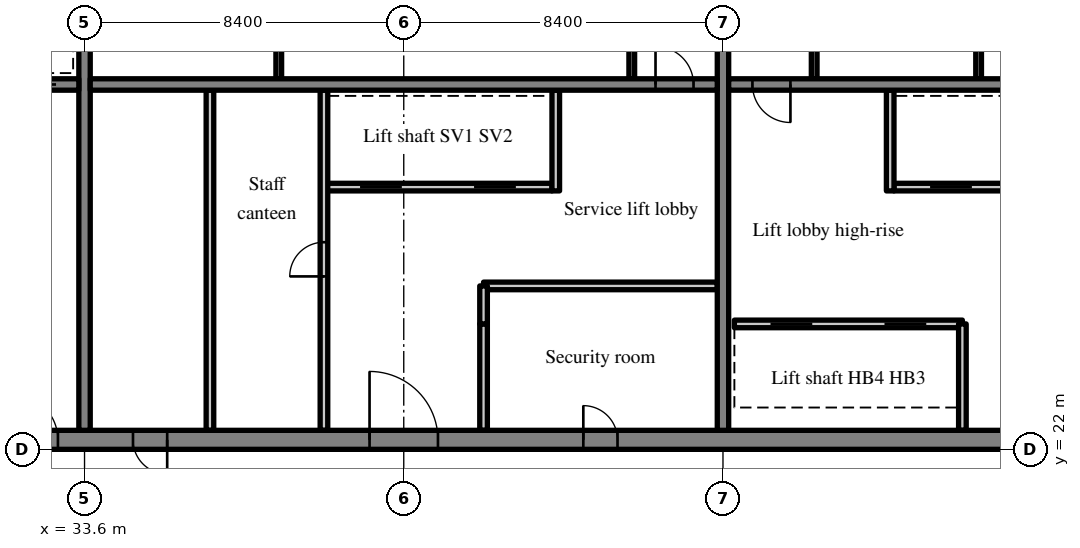
"""IFC4 building model, lengths in metres.
Left out: names, types, materials, properties, quantities, classifications, styles, units other than length and angle.
Written with IfcOpenShell. Run it as: python <this file> out.ifc"""

import sys

from ifc_helpers import new_model, si_unit, direction, frame, frame_2d, origin, place, context, subcontext, project, spatial, rectangle, extrude, source, transform, mapped, element, fill, save


model = new_model("IFC4")
c1 = context("Model", 3, precision=1e-05, world=origin(), true_north=direction((0.0, 1.0)))
c2 = subcontext(c1, "Body", "Model", "MODEL_VIEW")
j1 = project(units=[si_unit("LENGTHUNIT", "METRE"), si_unit("PLANEANGLEUNIT", "RADIAN")], contexts=[c1])
p1 = place(None, origin())
s1 = spatial("IfcSite", under=j1, at=p1, CompositionType="ELEMENT")
p2 = place(p1, origin())
s2 = spatial("IfcBuilding", under=s1, at=p2, CompositionType="ELEMENT")
p3 = place(p2, frame((0.0, 0.0, 323.7)))
s3 = spatial("IfcBuildingStorey", under=s2, at=p3, CompositionType="ELEMENT", Elevation=323.7)
m1 = source(origin(), c2, "Body", "SweptSolid", [
    extrude(rectangle(XDim=50.4, YDim=0.5, at=frame_2d((25.2, 0.0))), origin(), (0.0, 0.0, 1.0), 5.72),
])
p4 = place(p3, frame((25.2, 22.25, 0.0), z_axis=(0.0, 0.0, 1.0), x_axis=(1.0, 0.0, 0.0)))
e1 = element("IfcWall", 1, at=p4, inside=s3, PredefinedType="SHEAR", context=c2, shape_type="MappedRepresentation", body=[
    mapped(m1, transform((0.0, 0.0, 0.0), scale=1.0)),
])
m2 = source(origin(), c2, "Body", "SweptSolid", [
    extrude(rectangle(XDim=1.8, YDim=2.1, at=frame_2d((0.9, 1.05))), frame((0.0, 0.26, 0.0), z_axis=(0.0, -1.0, 0.0), x_axis=(1.0, 0.0, 0.0)), (0.0, 0.0, 1.0), 0.52),
])
p5 = place(p4, frame((15.9, 0.0, 0.0)))
e2 = element("IfcOpeningElement", 2, at=p5, cuts=e1, PredefinedType="OPENING", context=c2, shape_type="MappedRepresentation", body=[
    mapped(m2, transform((0.0, 0.0, 0.0), scale=1.0)),
])
m3 = source(origin(), c2, "Body", "SweptSolid", [
    extrude(rectangle(XDim=0.9, YDim=2.1, at=frame_2d((0.45, 1.05))), frame((0.0, 0.26, 0.0), z_axis=(0.0, -1.0, 0.0), x_axis=(1.0, 0.0, 0.0)), (0.0, 0.0, 1.0), 0.52),
])
p6 = place(p4, frame((9.675, 0.0, 0.0)))
e3 = element("IfcOpeningElement", 3, at=p6, cuts=e1, PredefinedType="OPENING", context=c2, shape_type="MappedRepresentation", body=[
    mapped(m3, transform((0.0, 0.0, 0.0), scale=1.0)),
])
p7 = place(p4, frame((21.525, 0.0, 0.0)))
e4 = element("IfcOpeningElement", 4, at=p7, cuts=e1, PredefinedType="OPENING", context=c2, shape_type="MappedRepresentation", body=[
    mapped(m3, transform((0.0, 0.0, 0.0), scale=1.0)),
])
p8 = place(p4, frame((32.7, 0.0, 0.0)))
e5 = element("IfcOpeningElement", 5, at=p8, cuts=e1, PredefinedType="OPENING", context=c2, shape_type="MappedRepresentation", body=[
    mapped(m2, transform((0.0, 0.0, 0.0), scale=1.0)),
])
m4 = source(origin(), c2, "Body", "SweptSolid", [
    extrude(rectangle(XDim=1.2, YDim=2.1, at=frame_2d((0.6, 1.05))), frame((0.0, 0.26, 0.0), z_axis=(0.0, -1.0, 0.0), x_axis=(1.0, 0.0, 0.0)), (0.0, 0.0, 1.0), 0.52),
])
p9 = place(p4, frame((6.5, 0.0, 0.0)))
e6 = element("IfcOpeningElement", 6, at=p9, cuts=e1, PredefinedType="OPENING", context=c2, shape_type="MappedRepresentation", body=[
    mapped(m4, transform((0.0, 0.0, 0.0), scale=1.0)),
])
p10 = place(p4, frame((47.975, 0.0, 0.0)))
e7 = element("IfcOpeningElement", 7, at=p10, cuts=e1, PredefinedType="OPENING", context=c2, shape_type="MappedRepresentation", body=[
    mapped(m4, transform((0.0, 0.0, 0.0), scale=1.0)),
])
m5 = source(origin(), c2, "Body", "SweptSolid", [
    extrude(rectangle(XDim=19.0, YDim=0.3, at=frame_2d((9.5, 0.0))), origin(), (0.0, 0.0, 1.0), 5.72),
])
p11 = place(p3, frame((33.6, 22.5, 0.0), z_axis=(0.0, 0.0, 1.0), x_axis=(0.0, 1.0, 0.0)))
e8 = element("IfcWall", 8, at=p11, inside=s3, PredefinedType="SHEAR", context=c2, shape_type="MappedRepresentation", body=[
    mapped(m5, transform((0.0, 0.0, 0.0), scale=1.0)),
])
m6 = source(origin(), c2, "Body", "SweptSolid", [
    extrude(rectangle(XDim=1.1, YDim=2.1, at=frame_2d((0.55, 1.05))), frame((0.0, 0.16, 0.0), z_axis=(0.0, -1.0, 0.0), x_axis=(1.0, 0.0, 0.0)), (0.0, 0.0, 1.0), 0.32),
])
p12 = place(p11, frame((12.95, 0.0, 0.0)))
e9 = element("IfcOpeningElement", 9, at=p12, cuts=e8, PredefinedType="OPENING", context=c2, shape_type="MappedRepresentation", body=[
    mapped(m6, transform((0.0, 0.0, 0.0), scale=1.0)),
])
p13 = place(p3, frame((50.4, 22.5, 0.0), z_axis=(0.0, 0.0, 1.0), x_axis=(0.0, 1.0, 0.0)))
e10 = element("IfcWall", 10, at=p13, inside=s3, PredefinedType="SHEAR", context=c2, shape_type="MappedRepresentation", body=[
    mapped(m5, transform((0.0, 0.0, 0.0), scale=1.0)),
])
p14 = place(p13, frame((12.95, 0.0, 0.0)))
e11 = element("IfcOpeningElement", 11, at=p14, cuts=e10, PredefinedType="OPENING", context=c2, shape_type="MappedRepresentation", body=[
    mapped(m6, transform((0.0, 0.0, 0.0), scale=1.0)),
])
m7 = source(origin(), c2, "Body", "SweptSolid", [
    extrude(rectangle(XDim=7.75, YDim=0.3, at=frame_2d((3.875, 0.0))), origin(), (0.0, 0.0, 1.0), 5.72),
])
p15 = place(p3, frame((25.7, 31.6, 0.0), z_axis=(0.0, 0.0, 1.0), x_axis=(1.0, 0.0, 0.0)))
e12 = element("IfcWall", 12, at=p15, inside=s3, PredefinedType="SHEAR", context=c2, shape_type="MappedRepresentation", body=[
    mapped(m7, transform((0.0, 0.0, 0.0), scale=1.0)),
])
p16 = place(p15, frame((6.05, 0.0, 0.0)))
e13 = element("IfcOpeningElement", 13, at=p16, cuts=e12, PredefinedType="OPENING", context=c2, shape_type="MappedRepresentation", body=[
    mapped(m6, transform((0.0, 0.0, 0.0), scale=1.0)),
])
m8 = source(origin(), c2, "Body", "SweptSolid", [
    extrude(rectangle(XDim=16.5, YDim=0.3, at=frame_2d((8.25, 0.0))), origin(), (0.0, 0.0, 1.0), 5.72),
])
p17 = place(p3, frame((33.75, 31.6, 0.0), z_axis=(0.0, 0.0, 1.0), x_axis=(1.0, 0.0, 0.0)))
e14 = element("IfcWall", 14, at=p17, inside=s3, PredefinedType="SHEAR", context=c2, shape_type="MappedRepresentation", body=[
    mapped(m8, transform((0.0, 0.0, 0.0), scale=1.0)),
])
m9 = source(origin(), c2, "Body", "SweptSolid", [
    extrude(rectangle(XDim=1.0, YDim=2.1, at=frame_2d((0.5, 1.05))), frame((0.0, 0.16, 0.0), z_axis=(0.0, -1.0, 0.0), x_axis=(1.0, 0.0, 0.0)), (0.0, 0.0, 1.0), 0.32),
])
p18 = place(p17, frame((14.875, 0.0, 0.0)))
e15 = element("IfcOpeningElement", 15, at=p18, cuts=e14, PredefinedType="OPENING", context=c2, shape_type="MappedRepresentation", body=[
    mapped(m9, transform((0.0, 0.0, 0.0), scale=1.0)),
])
p19 = place(p3, frame((50.55, 31.6, 0.0), z_axis=(0.0, 0.0, 1.0), x_axis=(1.0, 0.0, 0.0)))
e16 = element("IfcWall", 16, at=p19, inside=s3, PredefinedType="SHEAR", context=c2, shape_type="MappedRepresentation", body=[
    mapped(m8, transform((0.0, 0.0, 0.0), scale=1.0)),
])
p20 = place(p19, frame((0.625, 0.0, 0.0)))
e17 = element("IfcOpeningElement", 17, at=p20, cuts=e16, PredefinedType="OPENING", context=c2, shape_type="MappedRepresentation", body=[
    mapped(m9, transform((0.0, 0.0, 0.0), scale=1.0)),
])
m10 = source(origin(), c2, "Body", "SweptSolid", [
    extrude(rectangle(XDim=6.0, YDim=0.2, at=frame_2d((3.0, 0.0))), origin(), (0.0, 0.0, 1.0), 5.72),
])
p21 = place(p3, frame((39.9, 28.9, 0.0), z_axis=(0.0, 0.0, 1.0), x_axis=(1.0, 0.0, 0.0)))
e18 = element("IfcWall", 18, at=p21, inside=s3, PredefinedType="SOLIDWALL", context=c2, shape_type="MappedRepresentation", body=[
    mapped(m10, transform((0.0, 0.0, 0.0), scale=1.0)),
])
m11 = source(origin(), c2, "Body", "SweptSolid", [
    extrude(rectangle(XDim=1.1, YDim=2.1, at=frame_2d((0.55, 1.05))), frame((0.0, 0.11, 0.0), z_axis=(0.0, -1.0, 0.0), x_axis=(1.0, 0.0, 0.0)), (0.0, 0.0, 1.0), 0.22),
])
p22 = place(p21, frame((0.95, 0.0, 0.0)))
e19 = element("IfcOpeningElement", 19, at=p22, cuts=e18, PredefinedType="OPENING", context=c2, shape_type="MappedRepresentation", body=[
    mapped(m11, transform((0.0, 0.0, 0.0), scale=1.0)),
])
p23 = place(p21, frame((3.95, 0.0, 0.0)))
e20 = element("IfcOpeningElement", 20, at=p23, cuts=e18, PredefinedType="OPENING", context=c2, shape_type="MappedRepresentation", body=[
    mapped(m11, transform((0.0, 0.0, 0.0), scale=1.0)),
])
m12 = source(origin(), c2, "Body", "SweptSolid", [
    extrude(rectangle(XDim=8.95, YDim=0.2, at=frame_2d((4.475, 0.0))), origin(), (0.0, 0.0, 1.0), 5.72),
])
p24 = place(p3, frame((39.9, 22.5, 0.0), z_axis=(0.0, 0.0, 1.0), x_axis=(0.0, 1.0, 0.0)))
e21 = element("IfcWall", 21, at=p24, inside=s3, PredefinedType="PARTITIONING", context=c2, shape_type="MappedRepresentation", body=[
    mapped(m12, transform((0.0, 0.0, 0.0), scale=1.0)),
])
m13 = source(origin(), c2, "Body", "SweptSolid", [
    extrude(rectangle(XDim=0.9, YDim=2.1, at=frame_2d((0.45, 1.05))), frame((0.0, 0.11, 0.0), z_axis=(0.0, -1.0, 0.0), x_axis=(1.0, 0.0, 0.0)), (0.0, 0.0, 1.0), 0.22),
])
p25 = place(p24, frame((4.05, 0.0, 0.0)))
e22 = element("IfcOpeningElement", 22, at=p25, cuts=e21, PredefinedType="OPENING", context=c2, shape_type="MappedRepresentation", body=[
    mapped(m13, transform((0.0, 0.0, 0.0), scale=1.0)),
])
m14 = source(origin(), c2, "Body", "SweptSolid", [
    extrude(rectangle(XDim=2.8, YDim=0.2, at=frame_2d((1.4, 0.0))), origin(), (0.0, 0.0, 1.0), 5.72),
])
p26 = place(p3, frame((44.1, 22.5, 0.0), z_axis=(0.0, 0.0, 1.0), x_axis=(0.0, 1.0, 0.0)))
e23 = element("IfcWall", 23, at=p26, inside=s3, PredefinedType="PARTITIONING", context=c2, shape_type="MappedRepresentation", body=[
    mapped(m14, transform((0.0, 0.0, 0.0), scale=1.0)),
])
m15 = source(origin(), c2, "Body", "SweptSolid", [
    extrude(rectangle(XDim=2.65, YDim=0.2, at=frame_2d((1.325, 0.0))), origin(), (0.0, 0.0, 1.0), 5.72),
])
p27 = place(p3, frame((46.0, 28.8, 0.0), z_axis=(0.0, 0.0, 1.0), x_axis=(0.0, 1.0, 0.0)))
e24 = element("IfcWall", 24, at=p27, inside=s3, PredefinedType="SOLIDWALL", context=c2, shape_type="MappedRepresentation", body=[
    mapped(m15, transform((0.0, 0.0, 0.0), scale=1.0)),
])
p28 = place(p3, frame((36.9, 22.5, 0.0), z_axis=(0.0, 0.0, 1.0), x_axis=(0.0, 1.0, 0.0)))
e25 = element("IfcWall", 25, at=p28, inside=s3, PredefinedType="PARTITIONING", context=c2, shape_type="MappedRepresentation", body=[
    mapped(m12, transform((0.0, 0.0, 0.0), scale=1.0)),
])
m16 = source(origin(), c2, "Body", "SweptSolid", [
    extrude(rectangle(XDim=6.15, YDim=0.2, at=frame_2d((3.075, 0.0))), origin(), (0.0, 0.0, 1.0), 5.72),
])
p29 = place(p3, frame((44.1, 26.3, 0.0), z_axis=(0.0, 0.0, 1.0), x_axis=(1.0, 0.0, 0.0)))
e26 = element("IfcWall", 26, at=p29, inside=s3, PredefinedType="PARTITIONING", context=c2, shape_type="MappedRepresentation", body=[
    mapped(m16, transform((0.0, 0.0, 0.0), scale=1.0)),
])
m17 = source(origin(), c2, "Body", "SweptSolid", [
    extrude(rectangle(XDim=1.0, YDim=0.2, at=frame_2d((0.5, 0.0))), origin(), (0.0, 0.0, 1.0), 5.72),
])
p30 = place(p3, frame((44.1, 25.3, 0.0), z_axis=(0.0, 0.0, 1.0), x_axis=(0.0, 1.0, 0.0)))
e27 = element("IfcWall", 27, at=p30, inside=s3, PredefinedType="PARTITIONING", context=c2, shape_type="MappedRepresentation", body=[
    mapped(m17, transform((0.0, 0.0, 0.0), scale=1.0)),
])
m18 = source(origin(), c2, "Body", "SweptSolid", [
    extrude(rectangle(XDim=3.25, YDim=0.15, at=frame_2d((1.625, 0.0))), origin(), (0.0, 0.0, 1.0), 5.72),
])
for number, where, z_axis, x_axis in (
    (28, (48.0, 31.75, 0.0), (0.0, 0.0, 1.0), (0.0, 1.0, 0.0)),
    (29, (38.711, 31.75, 0.0), (0.0, 0.0, 1.0), (0.0, 1.0, 0.0)),
):
    element("IfcWall", number, at=place(p3, frame(where, z_axis=z_axis, x_axis=x_axis)), inside=s3, PredefinedType="PARTITIONING", context=c2, shape_type="MappedRepresentation", body=[
        mapped(m18, transform((0.0, 0.0, 0.0), scale=1.0)),
    ])
p31 = place(p3, frame((56.7, 25.3, 0.0), z_axis=(0.0, 0.0, 1.0), x_axis=(-1.0, 0.0, 0.0)))
e30 = element("IfcWall", 30, at=p31, inside=s3, PredefinedType="SOLIDWALL", context=c2, shape_type="MappedRepresentation", body=[
    mapped(m10, transform((0.0, 0.0, 0.0), scale=1.0)),
])
p32 = place(p31, frame((0.95, 0.0, 0.0)))
e31 = element("IfcOpeningElement", 31, at=p32, cuts=e30, PredefinedType="OPENING", context=c2, shape_type="MappedRepresentation", body=[
    mapped(m11, transform((0.0, 0.0, 0.0), scale=1.0)),
])
p33 = place(p31, frame((3.95, 0.0, 0.0)))
e32 = element("IfcOpeningElement", 32, at=p33, cuts=e30, PredefinedType="OPENING", context=c2, shape_type="MappedRepresentation", body=[
    mapped(m11, transform((0.0, 0.0, 0.0), scale=1.0)),
])
m19 = source(origin(), c2, "Body", "SweptSolid", [
    extrude(rectangle(XDim=12.15, YDim=0.2, at=frame_2d((6.075, 0.0))), origin(), (0.0, 0.0, 1.0), 5.72),
])
p34 = place(p3, frame((67.05, 28.9, 0.0), z_axis=(0.0, 0.0, 1.0), x_axis=(-1.0, 0.0, 0.0)))
e33 = element("IfcWall", 33, at=p34, inside=s3, PredefinedType="SOLIDWALL", context=c2, shape_type="MappedRepresentation", body=[
    mapped(m19, transform((0.0, 0.0, 0.0), scale=1.0)),
])
p35 = place(p34, frame((7.1, 0.0, 0.0)))
e34 = element("IfcOpeningElement", 34, at=p35, cuts=e33, PredefinedType="OPENING", context=c2, shape_type="MappedRepresentation", body=[
    mapped(m11, transform((0.0, 0.0, 0.0), scale=1.0)),
])
p36 = place(p34, frame((10.1, 0.0, 0.0)))
e35 = element("IfcOpeningElement", 35, at=p36, cuts=e33, PredefinedType="OPENING", context=c2, shape_type="MappedRepresentation", body=[
    mapped(m11, transform((0.0, 0.0, 0.0), scale=1.0)),
])
p37 = place(p34, frame((1.1, 0.0, 0.0)))
e36 = element("IfcOpeningElement", 36, at=p37, cuts=e33, PredefinedType="OPENING", context=c2, shape_type="MappedRepresentation", body=[
    mapped(m11, transform((0.0, 0.0, 0.0), scale=1.0)),
])
p38 = place(p34, frame((4.1, 0.0, 0.0)))
e37 = element("IfcOpeningElement", 37, at=p38, cuts=e33, PredefinedType="OPENING", context=c2, shape_type="MappedRepresentation", body=[
    mapped(m11, transform((0.0, 0.0, 0.0), scale=1.0)),
])
p39 = place(p3, frame((56.7, 22.5, 0.0), z_axis=(0.0, 0.0, 1.0), x_axis=(0.0, 1.0, 0.0)))
e38 = element("IfcWall", 38, at=p39, inside=s3, PredefinedType="SOLIDWALL", context=c2, shape_type="MappedRepresentation", body=[
    mapped(m14, transform((0.0, 0.0, 0.0), scale=1.0)),
])
p40 = place(p3, frame((54.8, 28.8, 0.0), z_axis=(0.0, 0.0, 1.0), x_axis=(0.0, 1.0, 0.0)))
e39 = element("IfcWall", 39, at=p40, inside=s3, PredefinedType="SOLIDWALL", context=c2, shape_type="MappedRepresentation", body=[
    mapped(m15, transform((0.0, 0.0, 0.0), scale=1.0)),
])
for number, where, z_axis, x_axis in (
    (40, (52.8, 31.75, 0.0), (0.0, 0.0, 1.0), (0.0, 1.0, 0.0)),
    (41, (57.127, 31.75, 0.0), (0.0, 0.0, 1.0), (0.0, 1.0, 0.0)),
):
    element("IfcWall", number, at=place(p3, frame(where, z_axis=z_axis, x_axis=x_axis)), inside=s3, PredefinedType="PARTITIONING", context=c2, shape_type="MappedRepresentation", body=[
        mapped(m18, transform((0.0, 0.0, 0.0), scale=1.0)),
    ])
m20 = source(origin(), c2, "Body", "SweptSolid", [
    extrude(rectangle(XDim=1.8, YDim=2.1, at=frame_2d((0.9, 1.05))), frame((0.0, 0.175, 0.0), z_axis=(0.0, -1.0, 0.0), x_axis=(1.0, 0.0, 0.0)), (0.0, 0.0, 1.0), 0.05),
])
p41 = place(p5, origin())
e42 = element("IfcDoor", 42, at=p41, inside=s3, OperationType="DOUBLE_DOOR_SINGLE_SWING", PredefinedType="DOOR", context=c2, shape_type="MappedRepresentation", body=[
    mapped(m20, transform((0.0, 0.0, 0.0), scale=1.0)),
])
fill(e2, e42)
m21 = source(origin(), c2, "Body", "SweptSolid", [
    extrude(rectangle(XDim=1.0, YDim=2.1, at=frame_2d((0.5, 1.05))), frame((0.0, 0.025, 0.0), z_axis=(0.0, -1.0, 0.0), x_axis=(1.0, 0.0, 0.0)), (0.0, 0.0, 1.0), 0.05),
])
p42 = place(p18, origin())
e43 = element("IfcDoor", 43, at=p42, inside=s3, OperationType="SINGLE_SWING_LEFT", PredefinedType="DOOR", context=c2, shape_type="MappedRepresentation", body=[
    mapped(m21, transform((0.0, 0.0, 0.0), scale=1.0)),
])
fill(e15, e43)
m22 = source(origin(), c2, "Body", "SweptSolid", [
    extrude(rectangle(XDim=1.1, YDim=2.1, at=frame_2d((0.55, 1.05))), frame((0.0, 0.025, 0.0), z_axis=(0.0, -1.0, 0.0), x_axis=(1.0, 0.0, 0.0)), (0.0, 0.0, 1.0), 0.05),
])
p43 = place(p22, origin())
e44 = element("IfcDoor", 44, at=p43, inside=s3, OperationType="SLIDING_TO_LEFT", PredefinedType="DOOR", context=c2, shape_type="MappedRepresentation", body=[
    mapped(m22, transform((0.0, 0.0, 0.0), scale=1.0)),
])
fill(e19, e44)
p44 = place(p23, origin())
e45 = element("IfcDoor", 45, at=p44, inside=s3, OperationType="SLIDING_TO_RIGHT", PredefinedType="DOOR", context=c2, shape_type="MappedRepresentation", body=[
    mapped(m22, transform((0.0, 0.0, 0.0), scale=1.0)),
])
fill(e20, e45)
m23 = source(origin(), c2, "Body", "SweptSolid", [
    extrude(rectangle(XDim=0.9, YDim=2.1, at=frame_2d((0.45, 1.05))), frame((0.0, 0.175, 0.0), z_axis=(0.0, -1.0, 0.0), x_axis=(1.0, 0.0, 0.0)), (0.0, 0.0, 1.0), 0.05),
])
p45 = place(p6, origin())
e46 = element("IfcDoor", 46, at=p45, inside=s3, OperationType="SINGLE_SWING_RIGHT", PredefinedType="DOOR", context=c2, shape_type="MappedRepresentation", body=[
    mapped(m23, transform((0.0, 0.0, 0.0), scale=1.0)),
])
fill(e3, e46)
m24 = source(origin(), c2, "Body", "SweptSolid", [
    extrude(rectangle(XDim=0.9, YDim=2.1, at=frame_2d((0.45, 1.05))), frame((0.0, 0.025, 0.0), z_axis=(0.0, -1.0, 0.0), x_axis=(1.0, 0.0, 0.0)), (0.0, 0.0, 1.0), 0.05),
])
p46 = place(p25, origin())
e47 = element("IfcDoor", 47, at=p46, inside=s3, OperationType="SINGLE_SWING_LEFT", PredefinedType="DOOR", context=c2, shape_type="MappedRepresentation", body=[
    mapped(m24, transform((0.0, 0.0, 0.0), scale=1.0)),
])
fill(e22, e47)
p47 = place(p7, origin())
e48 = element("IfcDoor", 48, at=p47, inside=s3, OperationType="SINGLE_SWING_LEFT", PredefinedType="DOOR", context=c2, shape_type="MappedRepresentation", body=[
    mapped(m23, transform((0.0, 0.0, 0.0), scale=1.0)),
])
fill(e4, e48)
p48 = place(p20, origin())
e49 = element("IfcDoor", 49, at=p48, inside=s3, OperationType="SINGLE_SWING_RIGHT", PredefinedType="DOOR", context=c2, shape_type="MappedRepresentation", body=[
    mapped(m21, transform((0.0, 0.0, 0.0), scale=1.0)),
])
fill(e17, e49)
p49 = place(p36, origin())
e50 = element("IfcDoor", 50, at=p49, inside=s3, OperationType="SLIDING_TO_LEFT", PredefinedType="DOOR", context=c2, shape_type="MappedRepresentation", body=[
    mapped(m22, transform((0.0, 0.0, 0.0), scale=1.0)),
])
fill(e35, e50)
p50 = place(p32, origin())
e51 = element("IfcDoor", 51, at=p50, inside=s3, OperationType="SLIDING_TO_RIGHT", PredefinedType="DOOR", context=c2, shape_type="MappedRepresentation", body=[
    mapped(m22, transform((0.0, 0.0, 0.0), scale=1.0)),
])
fill(e31, e51)
p51 = place(p33, origin())
e52 = element("IfcDoor", 52, at=p51, inside=s3, OperationType="SLIDING_TO_LEFT", PredefinedType="DOOR", context=c2, shape_type="MappedRepresentation", body=[
    mapped(m22, transform((0.0, 0.0, 0.0), scale=1.0)),
])
fill(e32, e52)
m25 = source(origin(), c2, "Body", "SweptSolid", [
    extrude(rectangle(XDim=1.2, YDim=2.1, at=frame_2d((0.6, 1.05))), frame((0.0, 0.175, 0.0), z_axis=(0.0, -1.0, 0.0), x_axis=(1.0, 0.0, 0.0)), (0.0, 0.0, 1.0), 0.05),
])
p52 = place(p9, origin())
e53 = element("IfcDoor", 53, at=p52, inside=s3, OperationType="SINGLE_SWING_LEFT", PredefinedType="DOOR", context=c2, shape_type="MappedRepresentation", body=[
    mapped(m25, transform((0.0, 0.0, 0.0), scale=1.0)),
])
fill(e6, e53)
p53 = place(p16, origin())
e54 = element("IfcDoor", 54, at=p53, inside=s3, OperationType="SLIDING_TO_LEFT", PredefinedType="DOOR", context=c2, shape_type="MappedRepresentation", body=[
    mapped(m22, transform((0.0, 0.0, 0.0), scale=1.0)),
])
fill(e13, e54)
save(model, sys.argv[1])
